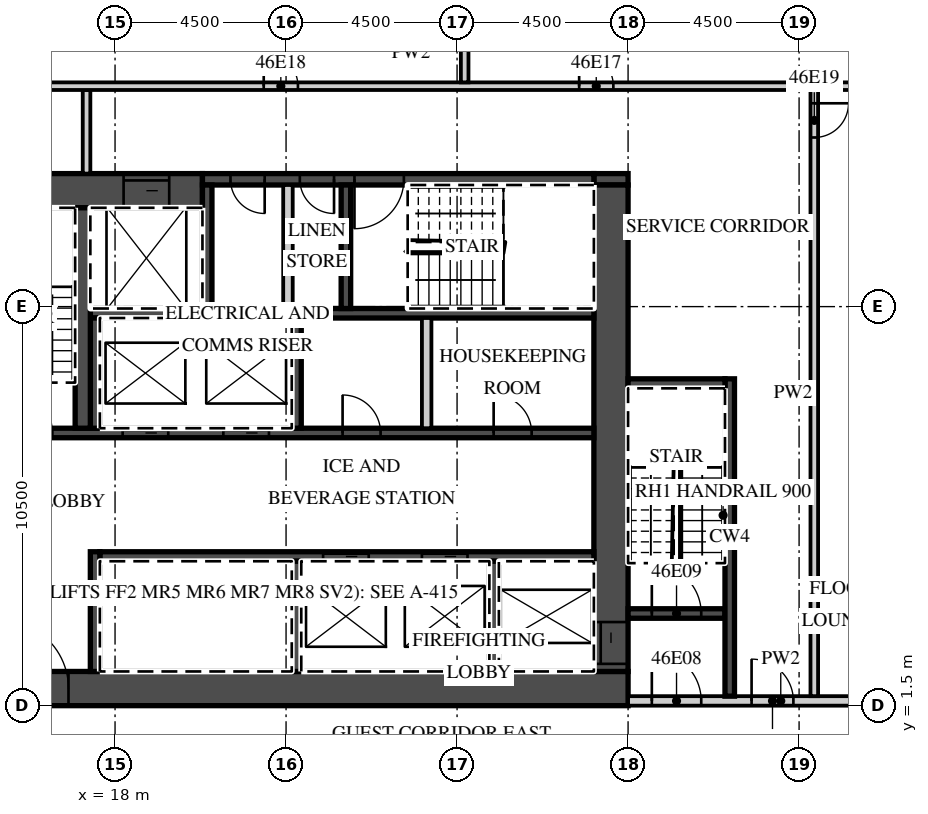
"""IFC4 building model, lengths in metres.
Left out: names, types, materials, properties, quantities, classifications, styles, units other than length and angle.
Written with IfcOpenShell. Run it as: python <this file> out.ifc"""

import sys

from ifc_helpers import new_model, si_unit, direction, frame, frame_2d, origin, place, context, subcontext, project, spatial, rectangle, extrude, element, fill, save


model = new_model("IFC4")
c1 = context("Model", 3, precision=1e-05, world=origin(), true_north=direction((0.0, 1.0)))
c2 = subcontext(c1, "Body", "Model", "MODEL_VIEW")
j1 = project(units=[si_unit("LENGTHUNIT", "METRE"), si_unit("PLANEANGLEUNIT", "RADIAN")], contexts=[c1])
p1 = place(None, origin())
s1 = spatial("IfcSite", under=j1, at=p1, CompositionType="ELEMENT")
p2 = place(p1, origin())
s2 = spatial("IfcBuilding", under=s1, at=p2, CompositionType="ELEMENT")
p3 = place(p2, frame((0.0, 0.0, 193.3)))
s3 = spatial("IfcBuildingStorey", under=s2, at=p3, CompositionType="ELEMENT", Elevation=193.3)
p4 = place(p3, frame((13.5, 1.95, 0.0), z_axis=(0.0, 0.0, 1.0), x_axis=(1.0, 0.0, 0.0)))
e1 = element("IfcWall", 1, at=p4, inside=s3, PredefinedType="SHEAR", context=c2, shape_type="SweptSolid", body=[
    extrude(rectangle(XDim=18.0, YDim=0.9, at=frame_2d((9.0, 0.0))), origin(), (0.0, 0.0, 1.0), 3.02),
])
p5 = place(p4, frame((1.475, 0.0, 0.0)))
e2 = element("IfcOpeningElement", 2, at=p5, cuts=e1, PredefinedType="OPENING", context=c2, shape_type="SweptSolid", body=[
    extrude(rectangle(XDim=1.8, YDim=2.1, at=frame_2d((0.9, 1.05))), frame((0.0, 0.46, 0.0), z_axis=(0.0, -1.0, 0.0), x_axis=(1.0, 0.0, 0.0)), (0.0, 0.0, 1.0), 0.92),
])
p6 = place(p3, frame((13.5, 15.05, 0.0), z_axis=(0.0, 0.0, 1.0), x_axis=(1.0, 0.0, 0.0)))
e3 = element("IfcWall", 3, at=p6, inside=s3, PredefinedType="SHEAR", context=c2, shape_type="SweptSolid", body=[
    extrude(rectangle(XDim=6.8, YDim=0.9, at=frame_2d((3.4, 0.0))), origin(), (0.0, 0.0, 1.0), 3.02),
])
p7 = place(p6, frame((4.725, 0.0, 0.0)))
e4 = element("IfcOpeningElement", 4, at=p7, cuts=e3, PredefinedType="OPENING", context=c2, shape_type="SweptSolid", body=[
    extrude(rectangle(XDim=1.2, YDim=2.1, at=frame_2d((0.6, 1.05))), frame((0.0, 0.46, 0.0), z_axis=(0.0, -1.0, 0.0), x_axis=(1.0, 0.0, 0.0)), (0.0, 0.0, 1.0), 0.92),
])
p8 = place(p3, frame((30.6, 15.35, 0.0), z_axis=(0.0, 0.0, 1.0), x_axis=(1.0, 0.0, 0.0)))
e5 = element("IfcWall", 5, at=p8, inside=s3, PredefinedType="SHEAR", context=c2, shape_type="SweptSolid", body=[
    extrude(rectangle(XDim=0.9, YDim=0.3, at=frame_2d((0.45, 0.0))), origin(), (0.0, 0.0, 1.0), 3.02),
])
p9 = place(p3, frame((20.3, 15.35, 0.0), z_axis=(0.0, 0.0, 1.0), x_axis=(1.0, 0.0, 0.0)))
e6 = element("IfcWall", 6, at=p9, inside=s3, PredefinedType="SHEAR", context=c2, shape_type="SweptSolid", body=[
    extrude(rectangle(XDim=10.3, YDim=0.3, at=frame_2d((5.15, 0.0))), origin(), (0.0, 0.0, 1.0), 3.02),
])
p10 = place(p9, frame((4.0, 0.0, 0.0)))
e7 = element("IfcOpeningElement", 7, at=p10, cuts=e6, PredefinedType="OPENING", context=c2, shape_type="SweptSolid", body=[
    extrude(rectangle(XDim=1.3, YDim=2.1, at=frame_2d((0.65, 1.05))), frame((0.0, 0.16, 0.0), z_axis=(0.0, -1.0, 0.0), x_axis=(1.0, 0.0, 0.0)), (0.0, 0.0, 1.0), 0.32),
])
p11 = place(p9, frame((2.562, 0.0, 0.0)))
e8 = element("IfcOpeningElement", 8, at=p11, cuts=e6, PredefinedType="OPENING", context=c2, shape_type="SweptSolid", body=[
    extrude(rectangle(XDim=0.9, YDim=2.1, at=frame_2d((0.45, 1.05))), frame((0.0, 0.16, 0.0), z_axis=(0.0, -1.0, 0.0), x_axis=(1.0, 0.0, 0.0)), (0.0, 0.0, 1.0), 0.32),
])
p12 = place(p9, frame((0.738, 0.0, 0.0)))
e9 = element("IfcOpeningElement", 9, at=p12, cuts=e6, PredefinedType="OPENING", context=c2, shape_type="SweptSolid", body=[
    extrude(rectangle(XDim=0.9, YDim=2.1, at=frame_2d((0.45, 1.05))), frame((0.0, 0.16, 0.0), z_axis=(0.0, -1.0, 0.0), x_axis=(1.0, 0.0, 0.0)), (0.0, 0.0, 1.0), 0.32),
])
p13 = place(p3, frame((31.05, 2.4, 0.0), z_axis=(0.0, 0.0, 1.0), x_axis=(0.0, 1.0, 0.0)))
e10 = element("IfcWall", 10, at=p13, inside=s3, PredefinedType="SHEAR", context=c2, shape_type="SweptSolid", body=[
    extrude(rectangle(XDim=12.8, YDim=0.9, at=frame_2d((6.4, 0.0))), origin(), (0.0, 0.0, 1.0), 3.02),
])
p14 = place(p13, frame((0.2, 0.0, 0.0)))
e11 = element("IfcOpeningElement", 11, at=p14, cuts=e10, PredefinedType="OPENING", context=c2, shape_type="SweptSolid", body=[
    extrude(rectangle(XDim=1.1, YDim=2.1, at=frame_2d((0.55, 1.05))), frame((0.0, 0.46, 0.0), z_axis=(0.0, -1.0, 0.0), x_axis=(1.0, 0.0, 0.0)), (0.0, 0.0, 1.0), 0.92),
])
p15 = place(p3, frame((17.6, 5.425, 0.0), z_axis=(0.0, 0.0, 1.0), x_axis=(1.0, 0.0, 0.0)))
e12 = element("IfcWall", 12, at=p15, inside=s3, PredefinedType="SHEAR", context=c2, shape_type="SweptSolid", body=[
    extrude(rectangle(XDim=13.0, YDim=0.25, at=frame_2d((6.5, 0.0))), origin(), (0.0, 0.0, 1.0), 3.02),
])
p16 = place(p15, frame((8.475, 0.0, 0.0)))
e13 = element("IfcOpeningElement", 13, at=p16, cuts=e12, PredefinedType="OPENING", context=c2, shape_type="SweptSolid", body=[
    extrude(rectangle(XDim=1.2, YDim=2.1, at=frame_2d((0.6, 1.05))), frame((0.0, 0.135, 0.0), z_axis=(0.0, -1.0, 0.0), x_axis=(1.0, 0.0, 0.0)), (0.0, 0.0, 1.0), 0.27),
])
p17 = place(p15, frame((5.875, 0.0, 0.0)))
e14 = element("IfcOpeningElement", 14, at=p17, cuts=e12, PredefinedType="OPENING", context=c2, shape_type="SweptSolid", body=[
    extrude(rectangle(XDim=1.2, YDim=2.1, at=frame_2d((0.6, 1.05))), frame((0.0, 0.135, 0.0), z_axis=(0.0, -1.0, 0.0), x_axis=(1.0, 0.0, 0.0)), (0.0, 0.0, 1.0), 0.27),
])
p18 = place(p3, frame((17.475, 2.4, 0.0), z_axis=(0.0, 0.0, 1.0), x_axis=(0.0, 1.0, 0.0)))
e15 = element("IfcWall", 15, at=p18, inside=s3, PredefinedType="SHEAR", context=c2, shape_type="SweptSolid", body=[
    extrude(rectangle(XDim=3.15, YDim=0.25, at=frame_2d((1.575, 0.0))), origin(), (0.0, 0.0, 1.0), 3.02),
])
for number, where, z_axis, x_axis in (
    (16, (27.975, 2.4, 0.0), (0.0, 0.0, 1.0), (0.0, 1.0, 0.0)),
    (17, (22.775, 2.4, 0.0), (0.0, 0.0, 1.0), (0.0, 1.0, 0.0)),
):
    element("IfcWall", number, at=place(p3, frame(where, z_axis=z_axis, x_axis=x_axis)), inside=s3, PredefinedType="SHEAR", context=c2, shape_type="SweptSolid", body=[
        extrude(rectangle(XDim=2.9, YDim=0.25, at=frame_2d((1.45, 0.0))), origin(), (0.0, 0.0, 1.0), 3.02),
    ])
p19 = place(p3, frame((14.4, 8.675, 0.0), z_axis=(0.0, 0.0, 1.0), x_axis=(1.0, 0.0, 0.0)))
e18 = element("IfcWall", 18, at=p19, inside=s3, PredefinedType="SHEAR", context=c2, shape_type="SweptSolid", body=[
    extrude(rectangle(XDim=16.2, YDim=0.25, at=frame_2d((8.1, 0.0))), origin(), (0.0, 0.0, 1.0), 3.02),
])
p20 = place(p19, frame((6.45, 0.0, 0.0)))
e19 = element("IfcOpeningElement", 19, at=p20, cuts=e18, PredefinedType="OPENING", context=c2, shape_type="SweptSolid", body=[
    extrude(rectangle(XDim=1.2, YDim=2.1, at=frame_2d((0.6, 1.05))), frame((0.0, 0.135, 0.0), z_axis=(0.0, -1.0, 0.0), x_axis=(1.0, 0.0, 0.0)), (0.0, 0.0, 1.0), 0.27),
])
p21 = place(p19, frame((3.8, 0.0, 0.0)))
e20 = element("IfcOpeningElement", 20, at=p21, cuts=e18, PredefinedType="OPENING", context=c2, shape_type="SweptSolid", body=[
    extrude(rectangle(XDim=1.2, YDim=2.1, at=frame_2d((0.6, 1.05))), frame((0.0, 0.135, 0.0), z_axis=(0.0, -1.0, 0.0), x_axis=(1.0, 0.0, 0.0)), (0.0, 0.0, 1.0), 0.27),
])
p22 = place(p19, frame((0.65, 0.0, 0.0)))
e21 = element("IfcOpeningElement", 21, at=p22, cuts=e18, PredefinedType="OPENING", context=c2, shape_type="SweptSolid", body=[
    extrude(rectangle(XDim=1.3, YDim=2.1, at=frame_2d((0.65, 1.05))), frame((0.0, 0.135, 0.0), z_axis=(0.0, -1.0, 0.0), x_axis=(1.0, 0.0, 0.0)), (0.0, 0.0, 1.0), 0.27),
])
p23 = place(p19, frame((13.562, 0.0, 0.0)))
e22 = element("IfcOpeningElement", 22, at=p23, cuts=e18, PredefinedType="OPENING", context=c2, shape_type="SweptSolid", body=[
    extrude(rectangle(XDim=1.0, YDim=2.1, at=frame_2d((0.5, 1.05))), frame((0.0, 0.135, 0.0), z_axis=(0.0, -1.0, 0.0), x_axis=(1.0, 0.0, 0.0)), (0.0, 0.0, 1.0), 0.27),
])
p24 = place(p19, frame((9.587, 0.0, 0.0)))
e23 = element("IfcOpeningElement", 23, at=p24, cuts=e18, PredefinedType="OPENING", context=c2, shape_type="SweptSolid", body=[
    extrude(rectangle(XDim=1.0, YDim=2.1, at=frame_2d((0.5, 1.05))), frame((0.0, 0.135, 0.0), z_axis=(0.0, -1.0, 0.0), x_axis=(1.0, 0.0, 0.0)), (0.0, 0.0, 1.0), 0.27),
])
p25 = place(p3, frame((17.35, 11.825, 0.0), z_axis=(0.0, 0.0, 1.0), x_axis=(1.0, 0.0, 0.0)))
e24 = element("IfcWall", 24, at=p25, inside=s3, PredefinedType="SHEAR", context=c2, shape_type="SweptSolid", body=[
    extrude(rectangle(XDim=13.25, YDim=0.25, at=frame_2d((6.625, 0.0))), origin(), (0.0, 0.0, 1.0), 3.02),
])
for number, where, z_axis, x_axis in (
    (25, (17.475, 8.8, 0.0), (0.0, 0.0, 1.0), (0.0, 1.0, 0.0)),
    (26, (22.775, 8.8, 0.0), (0.0, 0.0, 1.0), (0.0, 1.0, 0.0)),
):
    element("IfcWall", number, at=place(p3, frame(where, z_axis=z_axis, x_axis=x_axis)), inside=s3, PredefinedType="SHEAR", context=c2, shape_type="SweptSolid", body=[
        extrude(rectangle(XDim=2.9, YDim=0.25, at=frame_2d((1.45, 0.0))), origin(), (0.0, 0.0, 1.0), 3.02),
    ])
p26 = place(p3, frame((26.2, 8.8, 0.0), z_axis=(0.0, 0.0, 1.0), x_axis=(0.0, 1.0, 0.0)))
e27 = element("IfcWall", 27, at=p26, inside=s3, PredefinedType="PARTITIONING", context=c2, shape_type="SweptSolid", body=[
    extrude(rectangle(XDim=2.9, YDim=0.25, at=frame_2d((1.45, 0.0))), origin(), (0.0, 0.0, 1.0), 3.02),
])
p27 = place(p3, frame((17.15, 8.8, 0.0), z_axis=(0.0, 0.0, 1.0), x_axis=(0.0, 1.0, 0.0)))
e28 = element("IfcWall", 28, at=p27, inside=s3, PredefinedType="SHEAR", context=c2, shape_type="SweptSolid", body=[
    extrude(rectangle(XDim=5.8, YDim=0.4, at=frame_2d((2.9, 0.0))), origin(), (0.0, 0.0, 1.0), 3.02),
])
for number, where, z_axis, x_axis in (
    (29, (20.425, 11.95, 0.0), (0.0, 0.0, 1.0), (0.0, 1.0, 0.0)),
    (30, (24.075, 11.95, 0.0), (0.0, 0.0, 1.0), (0.0, 1.0, 0.0)),
):
    element("IfcWall", number, at=place(p3, frame(where, z_axis=z_axis, x_axis=x_axis)), inside=s3, PredefinedType="SHEAR", context=c2, shape_type="SweptSolid", body=[
        extrude(rectangle(XDim=3.25, YDim=0.25, at=frame_2d((1.625, 0.0))), origin(), (0.0, 0.0, 1.0), 3.02),
    ])
p28 = place(p3, frame((22.55, 11.95, 0.0), z_axis=(0.0, 0.0, 1.0), x_axis=(0.0, 1.0, 0.0)))
e31 = element("IfcWall", 31, at=p28, inside=s3, PredefinedType="PARTITIONING", context=c2, shape_type="SweptSolid", body=[
    extrude(rectangle(XDim=3.25, YDim=0.25, at=frame_2d((1.625, 0.0))), origin(), (0.0, 0.0, 1.0), 3.02),
])
p29 = place(p3, frame((31.5, 1.625, 0.0), z_axis=(0.0, 0.0, 1.0), x_axis=(1.0, 0.0, 0.0)))
e32 = element("IfcWall", 32, at=p29, inside=s3, PredefinedType="PARTITIONING", context=c2, shape_type="SweptSolid", body=[
    extrude(rectangle(XDim=8.035, YDim=0.25, at=frame_2d((4.018, 0.0))), origin(), (0.0, 0.0, 1.0), 3.02),
])
p30 = place(p29, frame((0.625, 0.0, 0.0)))
e33 = element("IfcOpeningElement", 33, at=p30, cuts=e32, PredefinedType="OPENING", context=c2, shape_type="SweptSolid", body=[
    extrude(rectangle(XDim=1.3, YDim=2.1, at=frame_2d((0.65, 1.05))), frame((0.0, 0.135, 0.0), z_axis=(0.0, -1.0, 0.0), x_axis=(1.0, 0.0, 0.0)), (0.0, 0.0, 1.0), 0.27),
])
p31 = place(p29, frame((3.25, 0.0, 0.0)))
e34 = element("IfcOpeningElement", 34, at=p31, cuts=e32, PredefinedType="OPENING", context=c2, shape_type="SweptSolid", body=[
    extrude(rectangle(XDim=1.1, YDim=2.1, at=frame_2d((0.55, 1.05))), frame((0.0, 0.135, 0.0), z_axis=(0.0, -1.0, 0.0), x_axis=(1.0, 0.0, 0.0)), (0.0, 0.0, 1.0), 0.27),
])
p32 = place(p3, frame((31.5, 3.925, 0.0), z_axis=(0.0, 0.0, 1.0), x_axis=(1.0, 0.0, 0.0)))
e35 = element("IfcWall", 35, at=p32, inside=s3, PredefinedType="SHEAR", context=c2, shape_type="SweptSolid", body=[
    extrude(rectangle(XDim=2.55, YDim=0.25, at=frame_2d((1.275, 0.0))), origin(), (0.0, 0.0, 1.0), 3.02),
])
p33 = place(p32, frame((0.625, 0.0, 0.0)))
e36 = element("IfcOpeningElement", 36, at=p33, cuts=e35, PredefinedType="OPENING", context=c2, shape_type="SweptSolid", body=[
    extrude(rectangle(XDim=1.3, YDim=2.1, at=frame_2d((0.65, 1.05))), frame((0.0, 0.135, 0.0), z_axis=(0.0, -1.0, 0.0), x_axis=(1.0, 0.0, 0.0)), (0.0, 0.0, 1.0), 0.27),
])
p34 = place(p3, frame((34.175, 1.75, 0.0), z_axis=(0.0, 0.0, 1.0), x_axis=(0.0, 1.0, 0.0)))
e37 = element("IfcWall", 37, at=p34, inside=s3, PredefinedType="SHEAR", context=c2, shape_type="SweptSolid", body=[
    extrude(rectangle(XDim=8.35, YDim=0.25, at=frame_2d((4.175, 0.0))), origin(), (0.0, 0.0, 1.0), 3.02),
])
p35 = place(p3, frame((31.5, 9.975, 0.0), z_axis=(0.0, 0.0, 1.0), x_axis=(1.0, 0.0, 0.0)))
e38 = element("IfcWall", 38, at=p35, inside=s3, PredefinedType="SHEAR", context=c2, shape_type="SweptSolid", body=[
    extrude(rectangle(XDim=2.55, YDim=0.25, at=frame_2d((1.275, 0.0))), origin(), (0.0, 0.0, 1.0), 3.02),
])
p36 = place(p3, frame((17.25, 15.5, 0.0), z_axis=(0.0, 0.0, 1.0), x_axis=(0.0, 1.0, 0.0)))
e39 = element("IfcWall", 39, at=p36, inside=s3, PredefinedType="PARTITIONING", context=c2, shape_type="SweptSolid", body=[
    extrude(rectangle(XDim=2.2, YDim=0.2, at=frame_2d((1.1, 0.0))), origin(), (0.0, 0.0, 1.0), 3.02),
])
p37 = place(p3, frame((36.4, 1.75, 0.0), z_axis=(0.0, 0.0, 1.0), x_axis=(0.0, 1.0, 0.0)))
e40 = element("IfcWall", 40, at=p37, inside=s3, PredefinedType="PARTITIONING", context=c2, shape_type="SweptSolid", body=[
    extrude(rectangle(XDim=15.95, YDim=0.2, at=frame_2d((7.975, 0.0))), origin(), (0.0, 0.0, 1.0), 3.02),
])
p38 = place(p37, frame((14.7, 0.0, 0.0)))
e41 = element("IfcOpeningElement", 41, at=p38, cuts=e40, PredefinedType="OPENING", context=c2, shape_type="SweptSolid", body=[
    extrude(rectangle(XDim=0.9, YDim=2.1, at=frame_2d((0.45, 1.05))), frame((0.0, 0.11, 0.0), z_axis=(0.0, -1.0, 0.0), x_axis=(1.0, 0.0, 0.0)), (0.0, 0.0, 1.0), 0.22),
])
p39 = place(p3, frame((13.6, 17.8, 0.0), z_axis=(0.0, 0.0, 1.0), x_axis=(1.0, 0.0, 0.0)))
e42 = element("IfcWall", 42, at=p39, inside=s3, PredefinedType="PARTITIONING", context=c2, shape_type="SweptSolid", body=[
    extrude(rectangle(XDim=24.378, YDim=0.2, at=frame_2d((12.189, 0.0))), origin(), (0.0, 0.0, 1.0), 3.02),
])
p40 = place(p39, frame((16.613, 0.0, 0.0)))
e43 = element("IfcOpeningElement", 43, at=p40, cuts=e42, PredefinedType="OPENING", context=c2, shape_type="SweptSolid", body=[
    extrude(rectangle(XDim=0.9, YDim=2.1, at=frame_2d((0.45, 1.05))), frame((0.0, 0.11, 0.0), z_axis=(0.0, -1.0, 0.0), x_axis=(1.0, 0.0, 0.0)), (0.0, 0.0, 1.0), 0.22),
])
p41 = place(p39, frame((8.312, 0.0, 0.0)))
e44 = element("IfcOpeningElement", 44, at=p41, cuts=e42, PredefinedType="OPENING", context=c2, shape_type="SweptSolid", body=[
    extrude(rectangle(XDim=0.9, YDim=2.1, at=frame_2d((0.45, 1.05))), frame((0.0, 0.11, 0.0), z_axis=(0.0, -1.0, 0.0), x_axis=(1.0, 0.0, 0.0)), (0.0, 0.0, 1.0), 0.22),
])
p42 = place(p3, frame((27.2, 17.9, 0.0), z_axis=(0.0, 0.0, 1.0), x_axis=(0.0, 1.0, 0.0)))
e45 = element("IfcWall", 45, at=p42, inside=s3, PredefinedType="PARTITIONING", context=c2, shape_type="SweptSolid", body=[
    extrude(rectangle(XDim=5.01, YDim=0.2, at=frame_2d((2.505, 0.0))), origin(), (0.0, 0.0, 1.0), 3.02),
])
p43 = place(p20, origin())
e46 = element("IfcDoor", 46, at=p43, inside=s3, OperationType="SLIDING_TO_LEFT", PredefinedType="DOOR", context=c2, shape_type="SweptSolid", body=[
    extrude(rectangle(XDim=1.2, YDim=2.1, at=frame_2d((0.6, 1.05))), frame((0.0, 0.025, 0.0), z_axis=(0.0, -1.0, 0.0), x_axis=(1.0, 0.0, 0.0)), (0.0, 0.0, 1.0), 0.05),
])
fill(e19, e46)
p44 = place(p21, origin())
e47 = element("IfcDoor", 47, at=p44, inside=s3, OperationType="SLIDING_TO_RIGHT", PredefinedType="DOOR", context=c2, shape_type="SweptSolid", body=[
    extrude(rectangle(XDim=1.2, YDim=2.1, at=frame_2d((0.6, 1.05))), frame((0.0, 0.025, 0.0), z_axis=(0.0, -1.0, 0.0), x_axis=(1.0, 0.0, 0.0)), (0.0, 0.0, 1.0), 0.05),
])
fill(e20, e47)
p45 = place(p16, origin())
e48 = element("IfcDoor", 48, at=p45, inside=s3, OperationType="SLIDING_TO_LEFT", PredefinedType="DOOR", context=c2, shape_type="SweptSolid", body=[
    extrude(rectangle(XDim=1.2, YDim=2.1, at=frame_2d((0.6, 1.05))), frame((0.0, 0.025, 0.0), z_axis=(0.0, -1.0, 0.0), x_axis=(1.0, 0.0, 0.0)), (0.0, 0.0, 1.0), 0.05),
])
fill(e13, e48)
p46 = place(p17, origin())
e49 = element("IfcDoor", 49, at=p46, inside=s3, OperationType="SLIDING_TO_RIGHT", PredefinedType="DOOR", context=c2, shape_type="SweptSolid", body=[
    extrude(rectangle(XDim=1.2, YDim=2.1, at=frame_2d((0.6, 1.05))), frame((0.0, 0.025, 0.0), z_axis=(0.0, -1.0, 0.0), x_axis=(1.0, 0.0, 0.0)), (0.0, 0.0, 1.0), 0.05),
])
fill(e14, e49)
p47 = place(p7, origin())
e50 = element("IfcDoor", 50, at=p47, inside=s3, OperationType="SLIDING_TO_LEFT", PredefinedType="DOOR", context=c2, shape_type="SweptSolid", body=[
    extrude(rectangle(XDim=1.2, YDim=2.1, at=frame_2d((0.6, 1.05))), frame((0.0, 0.025, 0.0), z_axis=(0.0, -1.0, 0.0), x_axis=(1.0, 0.0, 0.0)), (0.0, 0.0, 1.0), 0.05),
])
fill(e4, e50)
p48 = place(p14, origin())
e51 = element("IfcDoor", 51, at=p48, inside=s3, OperationType="SLIDING_TO_LEFT", PredefinedType="DOOR", context=c2, shape_type="SweptSolid", body=[
    extrude(rectangle(XDim=1.1, YDim=2.1, at=frame_2d((0.55, 1.05))), frame((0.0, 0.025, 0.0), z_axis=(0.0, -1.0, 0.0), x_axis=(1.0, 0.0, 0.0)), (0.0, 0.0, 1.0), 0.05),
])
fill(e11, e51)
p49 = place(p5, origin())
e52 = element("IfcDoor", 52, at=p49, inside=s3, OperationType="DOUBLE_DOOR_DOUBLE_SWING", PredefinedType="DOOR", context=c2, shape_type="SweptSolid", body=[
    extrude(rectangle(XDim=1.8, YDim=2.1, at=frame_2d((0.9, 1.05))), frame((0.0, 0.025, 0.0), z_axis=(0.0, -1.0, 0.0), x_axis=(1.0, 0.0, 0.0)), (0.0, 0.0, 1.0), 0.05),
])
fill(e2, e52)
p50 = place(p30, origin())
e53 = element("IfcDoor", 53, at=p50, inside=s3, OperationType="SINGLE_SWING_LEFT", PredefinedType="DOOR", context=c2, shape_type="SweptSolid", body=[
    extrude(rectangle(XDim=1.3, YDim=2.1, at=frame_2d((0.65, 1.05))), frame((0.0, 0.025, 0.0), z_axis=(0.0, -1.0, 0.0), x_axis=(1.0, 0.0, 0.0)), (0.0, 0.0, 1.0), 0.05),
])
fill(e33, e53)
p51 = place(p33, origin())
e54 = element("IfcDoor", 54, at=p51, inside=s3, OperationType="SINGLE_SWING_LEFT", PredefinedType="DOOR", context=c2, shape_type="SweptSolid", body=[
    extrude(rectangle(XDim=1.3, YDim=2.1, at=frame_2d((0.65, 1.05))), frame((0.0, 0.025, 0.0), z_axis=(0.0, -1.0, 0.0), x_axis=(1.0, 0.0, 0.0)), (0.0, 0.0, 1.0), 0.05),
])
fill(e36, e54)
p52 = place(p31, origin())
e55 = element("IfcDoor", 55, at=p52, inside=s3, OperationType="SINGLE_SWING_LEFT", PredefinedType="DOOR", context=c2, shape_type="SweptSolid", body=[
    extrude(rectangle(XDim=1.1, YDim=2.1, at=frame_2d((0.55, 1.05))), frame((0.0, 0.025, 0.0), z_axis=(0.0, -1.0, 0.0), x_axis=(1.0, 0.0, 0.0)), (0.0, 0.0, 1.0), 0.05),
])
fill(e34, e55)
p53 = place(p10, origin())
e56 = element("IfcDoor", 56, at=p53, inside=s3, OperationType="SINGLE_SWING_LEFT", PredefinedType="DOOR", context=c2, shape_type="SweptSolid", body=[
    extrude(rectangle(XDim=1.3, YDim=2.1, at=frame_2d((0.65, 1.05))), frame((0.0, 0.025, 0.0), z_axis=(0.0, -1.0, 0.0), x_axis=(1.0, 0.0, 0.0)), (0.0, 0.0, 1.0), 0.05),
])
fill(e7, e56)
p54 = place(p11, origin())
e57 = element("IfcDoor", 57, at=p54, inside=s3, OperationType="SINGLE_SWING_RIGHT", PredefinedType="DOOR", context=c2, shape_type="SweptSolid", body=[
    extrude(rectangle(XDim=0.9, YDim=2.1, at=frame_2d((0.45, 1.05))), frame((0.0, 0.025, 0.0), z_axis=(0.0, -1.0, 0.0), x_axis=(1.0, 0.0, 0.0)), (0.0, 0.0, 1.0), 0.05),
])
fill(e8, e57)
p55 = place(p12, origin())
e58 = element("IfcDoor", 58, at=p55, inside=s3, OperationType="SINGLE_SWING_RIGHT", PredefinedType="DOOR", context=c2, shape_type="SweptSolid", body=[
    extrude(rectangle(XDim=0.9, YDim=2.1, at=frame_2d((0.45, 1.05))), frame((0.0, 0.025, 0.0), z_axis=(0.0, -1.0, 0.0), x_axis=(1.0, 0.0, 0.0)), (0.0, 0.0, 1.0), 0.05),
])
fill(e9, e58)
p56 = place(p23, origin())
e59 = element("IfcDoor", 59, at=p56, inside=s3, OperationType="SINGLE_SWING_LEFT", PredefinedType="DOOR", context=c2, shape_type="SweptSolid", body=[
    extrude(rectangle(XDim=1.0, YDim=2.1, at=frame_2d((0.5, 1.05))), frame((0.0, 0.025, 0.0), z_axis=(0.0, -1.0, 0.0), x_axis=(1.0, 0.0, 0.0)), (0.0, 0.0, 1.0), 0.05),
])
fill(e22, e59)
p57 = place(p24, origin())
e60 = element("IfcDoor", 60, at=p57, inside=s3, OperationType="SINGLE_SWING_LEFT", PredefinedType="DOOR", context=c2, shape_type="SweptSolid", body=[
    extrude(rectangle(XDim=1.0, YDim=2.1, at=frame_2d((0.5, 1.05))), frame((0.0, 0.025, 0.0), z_axis=(0.0, -1.0, 0.0), x_axis=(1.0, 0.0, 0.0)), (0.0, 0.0, 1.0), 0.05),
])
fill(e23, e60)
p58 = place(p40, origin())
e61 = element("IfcDoor", 61, at=p58, inside=s3, OperationType="SINGLE_SWING_LEFT", PredefinedType="DOOR", context=c2, shape_type="SweptSolid", body=[
    extrude(rectangle(XDim=0.9, YDim=2.1, at=frame_2d((0.45, 1.05))), frame((0.0, 0.025, 0.0), z_axis=(0.0, -1.0, 0.0), x_axis=(1.0, 0.0, 0.0)), (0.0, 0.0, 1.0), 0.05),
])
fill(e43, e61)
p59 = place(p41, origin())
e62 = element("IfcDoor", 62, at=p59, inside=s3, OperationType="SINGLE_SWING_LEFT", PredefinedType="DOOR", context=c2, shape_type="SweptSolid", body=[
    extrude(rectangle(XDim=0.9, YDim=2.1, at=frame_2d((0.45, 1.05))), frame((0.0, 0.025, 0.0), z_axis=(0.0, -1.0, 0.0), x_axis=(1.0, 0.0, 0.0)), (0.0, 0.0, 1.0), 0.05),
])
fill(e44, e62)
p60 = place(p38, origin())
e63 = element("IfcDoor", 63, at=p60, inside=s3, OperationType="SINGLE_SWING_RIGHT", PredefinedType="DOOR", context=c2, shape_type="SweptSolid", body=[
    extrude(rectangle(XDim=0.9, YDim=2.1, at=frame_2d((0.45, 1.05))), frame((0.0, 0.025, 0.0), z_axis=(0.0, -1.0, 0.0), x_axis=(1.0, 0.0, 0.0)), (0.0, 0.0, 1.0), 0.05),
])
fill(e41, e63)
save(model, sys.argv[1])
